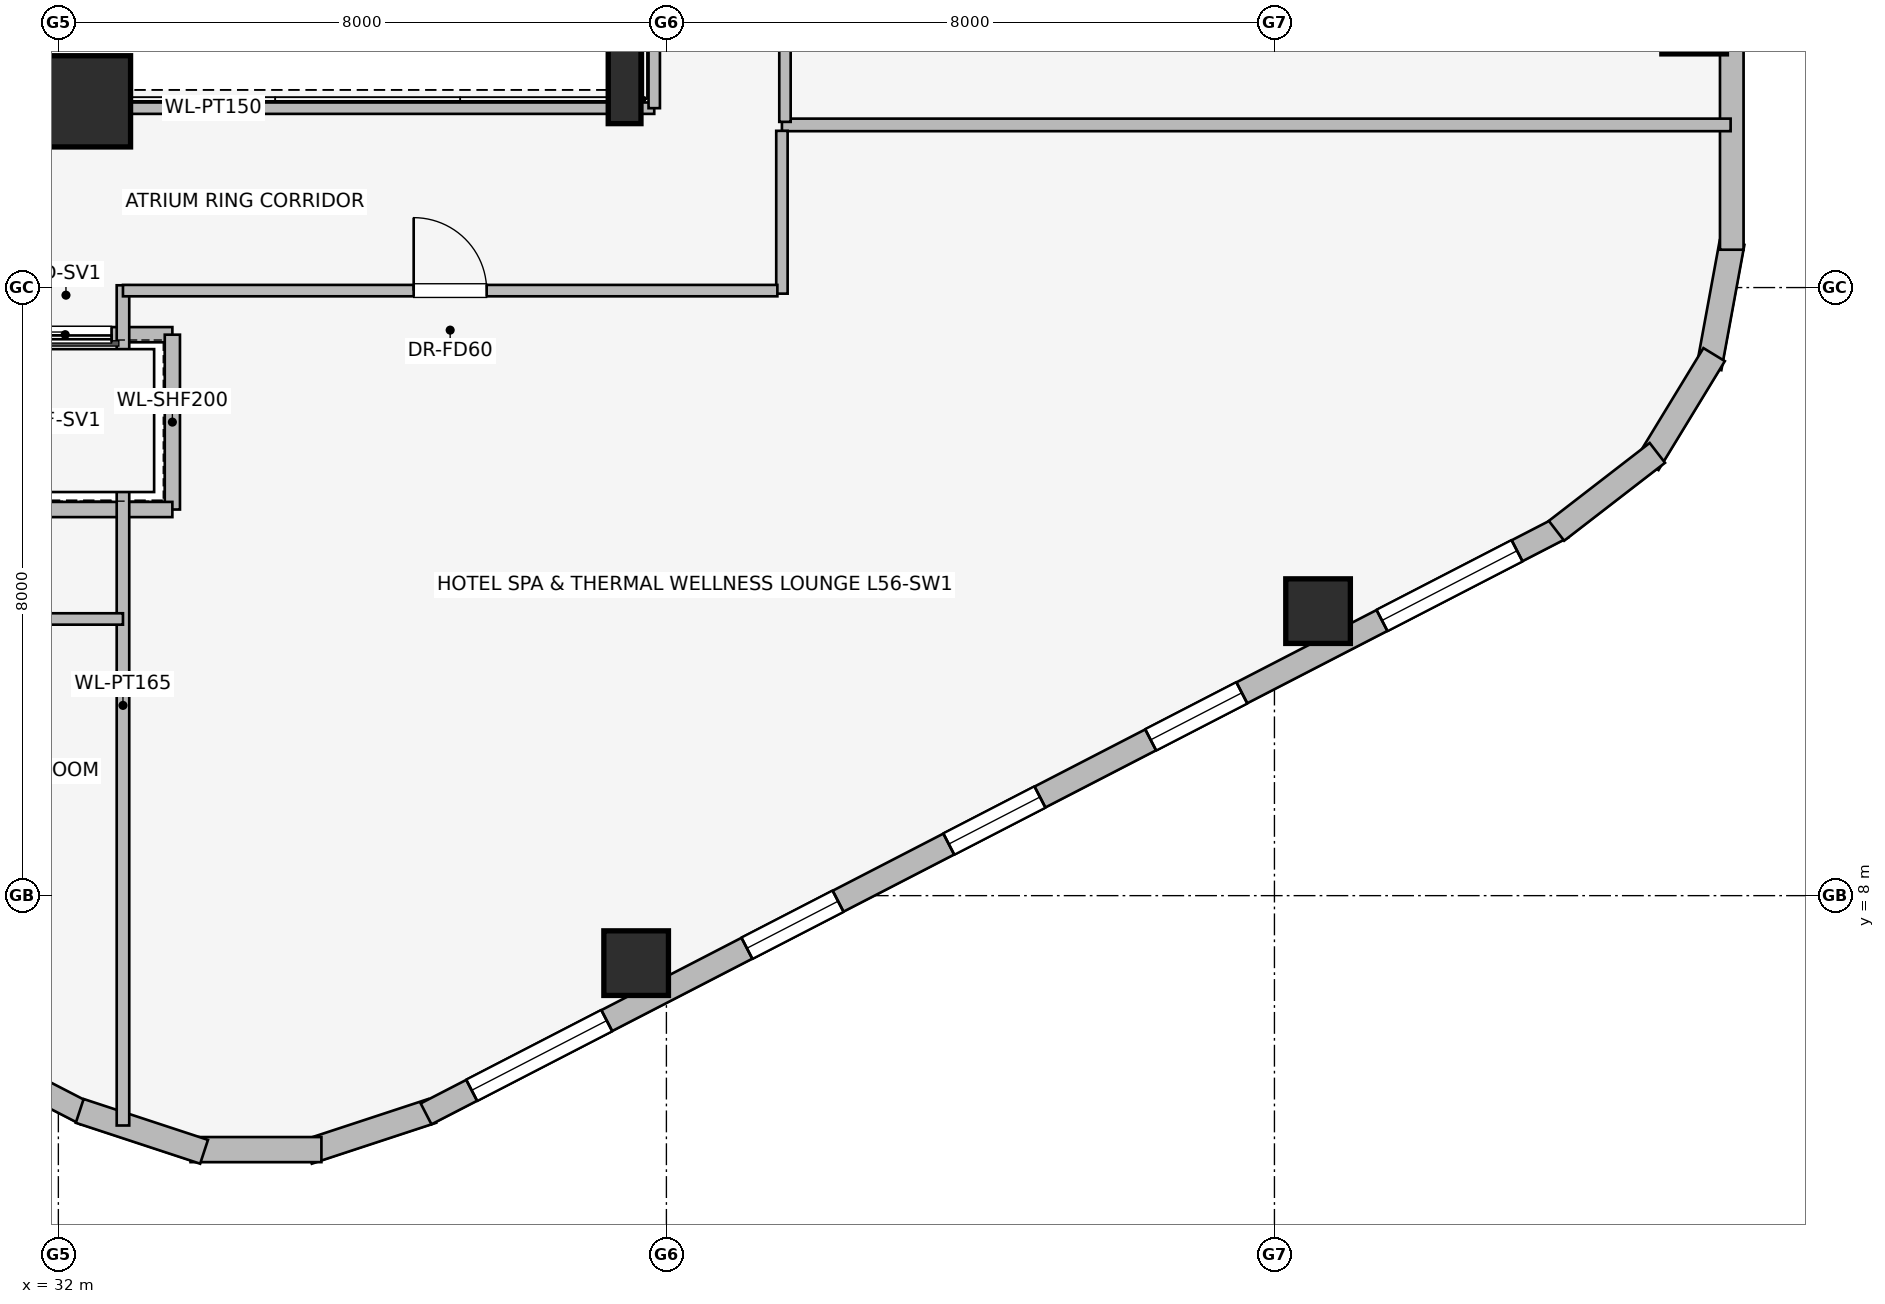
"""IFC4 building model, lengths in metres.
Left out: names, types, materials, properties, quantities, classifications, styles, units other than length and angle.
Written with IfcOpenShell. Run it as: python <this file> out.ifc"""

import sys

from ifc_helpers import new_model, si_unit, direction, frame, frame_2d, origin, origin_2d, place, context, subcontext, project, spatial, rectangle, i_section, extrude, element, fill, save


model = new_model("IFC4")
c1 = context("Model", 3, precision=1e-05, world=origin(), true_north=direction((0.0, 1.0)))
c2 = subcontext(c1, "Body", "Model", "MODEL_VIEW")
j1 = project(units=[si_unit("LENGTHUNIT", "METRE"), si_unit("PLANEANGLEUNIT", "RADIAN")], contexts=[c1])
p1 = place(None, origin())
s1 = spatial("IfcSite", under=j1, at=p1, CompositionType="ELEMENT")
p2 = place(p1, origin())
s2 = spatial("IfcBuilding", under=s1, at=p2, CompositionType="ELEMENT")
p3 = place(p2, frame((0.0, 0.0, 206.8)))
s3 = spatial("IfcBuildingStorey", under=s2, at=p3, CompositionType="ELEMENT", Elevation=206.8)
p4 = place(p3, frame((32.35, 18.45, 0.0), z_axis=(0.0, 0.0, 1.0), x_axis=(1.0, 0.0, 0.0)))
e1 = element("IfcColumn", 1, at=p4, inside=s3, PredefinedType="COLUMN", context=c2, shape_type="SweptSolid", body=[
    extrude(rectangle(XDim=1.2, YDim=1.2, at=origin_2d()), origin(), (0.0, 0.0, 1.0), 3.45),
])
for number, where, z_axis, x_axis in (
    (2, (39.602, 7.112, 0.0), (0.0, 0.0, 1.0), (1.0, 0.0, 0.0)),
    (3, (48.574, 11.743, 0.0), (0.0, 0.0, 1.0), (1.0, 0.0, 0.0)),
    (4, (53.522, 19.499, 0.0), (0.0, 0.0, 1.0), (1.0, 0.0, 0.0)),
):
    element("IfcColumn", number, at=place(p3, frame(where, z_axis=z_axis, x_axis=x_axis)), inside=s3, PredefinedType="COLUMN", context=c2, shape_type="SweptSolid", body=[
        extrude(rectangle(XDim=0.85, YDim=0.85, at=origin_2d()), origin(), (0.0, 0.0, 1.0), 3.45),
    ])
p5 = place(p3, frame((39.45, 18.65, 0.0), z_axis=(0.0, 0.0, 1.0), x_axis=(1.0, 0.0, 0.0)))
e5 = element("IfcColumn", 5, at=p5, inside=s3, PredefinedType="COLUMN", context=c2, shape_type="SweptSolid", body=[
    extrude(i_section(OverallWidth=0.431, OverallDepth=0.987, WebThickness=0.034, FlangeThickness=0.062, at=origin_2d()), origin(), (0.0, 0.0, 1.0), 3.45),
])
p6 = place(p3, frame((32.362, 5.129, 0.0), z_axis=(0.0, 0.0, 1.0), x_axis=(-0.888626188278, 0.458632202867, 0.0)))
e6 = element("IfcWall", 6, at=p6, inside=s3, PredefinedType="STANDARD", context=c2, shape_type="SweptSolid", body=[
    extrude(rectangle(XDim=16.828, YDim=0.31, at=frame_2d((8.414, 0.0))), origin(), (0.0, 0.0, 1.0), 3.19),
])
p7 = place(p6, frame((0.675, 0.0, 0.75)))
e7 = element("IfcOpeningElement", 7, at=p7, cuts=e6, PredefinedType="OPENING", context=c2, shape_type="SweptSolid", body=[
    extrude(rectangle(XDim=2.0, YDim=1.5, at=frame_2d((1.0, 0.75))), frame((0.0, 0.165, 0.0), z_axis=(0.0, -1.0, 0.0), x_axis=(1.0, 0.0, 0.0)), (0.0, 0.0, 1.0), 0.33),
])
p8 = place(p6, frame((4.75, 0.0, 0.75)))
e8 = element("IfcOpeningElement", 8, at=p8, cuts=e6, PredefinedType="OPENING", context=c2, shape_type="SweptSolid", body=[
    extrude(rectangle(XDim=1.35, YDim=1.45, at=frame_2d((0.675, 0.725))), frame((0.0, 0.165, 0.0), z_axis=(0.0, -1.0, 0.0), x_axis=(1.0, 0.0, 0.0)), (0.0, 0.0, 1.0), 0.33),
])
p9 = place(p6, frame((7.739, 0.0, 0.75)))
e9 = element("IfcOpeningElement", 9, at=p9, cuts=e6, PredefinedType="OPENING", context=c2, shape_type="SweptSolid", body=[
    extrude(rectangle(XDim=1.35, YDim=1.45, at=frame_2d((0.675, 0.725))), frame((0.0, 0.165, 0.0), z_axis=(0.0, -1.0, 0.0), x_axis=(1.0, 0.0, 0.0)), (0.0, 0.0, 1.0), 0.33),
])
p10 = place(p6, frame((10.728, 0.0, 0.75)))
e10 = element("IfcOpeningElement", 10, at=p10, cuts=e6, PredefinedType="OPENING", context=c2, shape_type="SweptSolid", body=[
    extrude(rectangle(XDim=1.35, YDim=1.45, at=frame_2d((0.675, 0.725))), frame((0.0, 0.165, 0.0), z_axis=(0.0, -1.0, 0.0), x_axis=(1.0, 0.0, 0.0)), (0.0, 0.0, 1.0), 0.33),
])
p11 = place(p6, frame((14.885, 0.0, 0.75)))
e11 = element("IfcOpeningElement", 11, at=p11, cuts=e6, PredefinedType="OPENING", context=c2, shape_type="SweptSolid", body=[
    extrude(rectangle(XDim=1.05, YDim=1.4, at=frame_2d((0.525, 0.7))), frame((0.0, 0.165, 0.0), z_axis=(0.0, -1.0, 0.0), x_axis=(1.0, 0.0, 0.0)), (0.0, 0.0, 1.0), 0.33),
])
p12 = place(p3, frame((36.919, 5.168, 0.0), z_axis=(0.0, 0.0, 1.0), x_axis=(-0.949937416267, -0.312440242569, 0.0)))
e12 = element("IfcWall", 12, at=p12, inside=s3, PredefinedType="STANDARD", context=c2, shape_type="SweptSolid", body=[
    extrude(rectangle(XDim=1.722, YDim=0.33, at=frame_2d((0.861, 0.0))), origin(), (0.0, 0.0, 1.0), 3.19),
])
p13 = place(p3, frame((35.461, 4.659, 0.0), z_axis=(0.0, 0.0, 1.0), x_axis=(-1.0, 0.0, 0.0)))
e13 = element("IfcWall", 13, at=p13, inside=s3, PredefinedType="STANDARD", context=c2, shape_type="SweptSolid", body=[
    extrude(rectangle(XDim=1.722, YDim=0.33, at=frame_2d((0.861, 0.0))), origin(), (0.0, 0.0, 1.0), 3.19),
])
p14 = place(p3, frame((33.917, 4.63, 0.0), z_axis=(0.0, 0.0, 1.0), x_axis=(-0.949937416267, 0.312440242569, 0.0)))
e14 = element("IfcWall", 14, at=p14, inside=s3, PredefinedType="STANDARD", context=c2, shape_type="SweptSolid", body=[
    extrude(rectangle(XDim=1.722, YDim=0.33, at=frame_2d((0.861, 0.0))), origin(), (0.0, 0.0, 1.0), 3.19),
])
p15 = place(p3, frame((51.792, 12.847, 0.0), z_axis=(0.0, 0.0, 1.0), x_axis=(-0.888626188278, -0.458632202867, 0.0)))
e15 = element("IfcWall", 15, at=p15, inside=s3, PredefinedType="STANDARD", context=c2, shape_type="SweptSolid", body=[
    extrude(rectangle(XDim=16.828, YDim=0.31, at=frame_2d((8.414, 0.0))), origin(), (0.0, 0.0, 1.0), 3.19),
])
p16 = place(p15, frame((0.675, 0.0, 0.75)))
e16 = element("IfcOpeningElement", 16, at=p16, cuts=e15, PredefinedType="OPENING", context=c2, shape_type="SweptSolid", body=[
    extrude(rectangle(XDim=2.0, YDim=1.5, at=frame_2d((1.0, 0.75))), frame((0.0, 0.165, 0.0), z_axis=(0.0, -1.0, 0.0), x_axis=(1.0, 0.0, 0.0)), (0.0, 0.0, 1.0), 0.33),
])
p17 = place(p15, frame((4.75, 0.0, 0.75)))
e17 = element("IfcOpeningElement", 17, at=p17, cuts=e15, PredefinedType="OPENING", context=c2, shape_type="SweptSolid", body=[
    extrude(rectangle(XDim=1.35, YDim=1.45, at=frame_2d((0.675, 0.725))), frame((0.0, 0.165, 0.0), z_axis=(0.0, -1.0, 0.0), x_axis=(1.0, 0.0, 0.0)), (0.0, 0.0, 1.0), 0.33),
])
p18 = place(p15, frame((7.739, 0.0, 0.75)))
e18 = element("IfcOpeningElement", 18, at=p18, cuts=e15, PredefinedType="OPENING", context=c2, shape_type="SweptSolid", body=[
    extrude(rectangle(XDim=1.35, YDim=1.45, at=frame_2d((0.675, 0.725))), frame((0.0, 0.165, 0.0), z_axis=(0.0, -1.0, 0.0), x_axis=(1.0, 0.0, 0.0)), (0.0, 0.0, 1.0), 0.33),
])
p19 = place(p15, frame((10.728, 0.0, 0.75)))
e19 = element("IfcOpeningElement", 19, at=p19, cuts=e15, PredefinedType="OPENING", context=c2, shape_type="SweptSolid", body=[
    extrude(rectangle(XDim=1.35, YDim=1.45, at=frame_2d((0.675, 0.725))), frame((0.0, 0.165, 0.0), z_axis=(0.0, -1.0, 0.0), x_axis=(1.0, 0.0, 0.0)), (0.0, 0.0, 1.0), 0.33),
])
p20 = place(p15, frame((14.153, 0.0, 0.75)))
e20 = element("IfcOpeningElement", 20, at=p20, cuts=e15, PredefinedType="OPENING", context=c2, shape_type="SweptSolid", body=[
    extrude(rectangle(XDim=2.0, YDim=1.5, at=frame_2d((1.0, 0.75))), frame((0.0, 0.165, 0.0), z_axis=(0.0, -1.0, 0.0), x_axis=(1.0, 0.0, 0.0)), (0.0, 0.0, 1.0), 0.33),
])
p21 = place(p3, frame((54.021, 16.592, 0.0), z_axis=(0.0, 0.0, 1.0), x_axis=(-0.180717642671, -0.983535019014, 0.0)))
e21 = element("IfcWall", 21, at=p21, inside=s3, PredefinedType="STANDARD", context=c2, shape_type="SweptSolid", body=[
    extrude(rectangle(XDim=1.677, YDim=0.33, at=frame_2d((0.838, 0.0))), origin(), (0.0, 0.0, 1.0), 3.19),
])
p22 = place(p3, frame((53.785, 15.118, 0.0), z_axis=(0.0, 0.0, 1.0), x_axis=(-0.520219286058, -0.85403272444, 0.0)))
e22 = element("IfcWall", 22, at=p22, inside=s3, PredefinedType="STANDARD", context=c2, shape_type="SweptSolid", body=[
    extrude(rectangle(XDim=1.678, YDim=0.33, at=frame_2d((0.839, 0.0))), origin(), (0.0, 0.0, 1.0), 3.19),
])
p23 = place(p3, frame((53.038, 13.825, 0.0), z_axis=(0.0, 0.0, 1.0), x_axis=(-0.791464279355, -0.611215423976, 0.0)))
e23 = element("IfcWall", 23, at=p23, inside=s3, PredefinedType="STANDARD", context=c2, shape_type="SweptSolid", body=[
    extrude(rectangle(XDim=1.677, YDim=0.33, at=frame_2d((0.838, 0.0))), origin(), (0.0, 0.0, 1.0), 3.19),
])
p24 = place(p3, frame((54.017, 31.502, 0.0), z_axis=(0.0, 0.0, 1.0), x_axis=(0.0, -1.0, 0.0)))
e24 = element("IfcWall", 24, at=p24, inside=s3, PredefinedType="STANDARD", context=c2, shape_type="SweptSolid", body=[
    extrude(rectangle(XDim=15.004, YDim=0.31, at=frame_2d((7.502, 0.0))), origin(), (0.0, 0.0, 1.0), 3.19),
])
p25 = place(p24, frame((4.007, 0.0, 0.75)))
e25 = element("IfcOpeningElement", 25, at=p25, cuts=e24, PredefinedType="OPENING", context=c2, shape_type="SweptSolid", body=[
    extrude(rectangle(XDim=1.05, YDim=1.4, at=frame_2d((0.525, 0.7))), frame((0.0, 0.165, 0.0), z_axis=(0.0, -1.0, 0.0), x_axis=(1.0, 0.0, 0.0)), (0.0, 0.0, 1.0), 0.33),
])
p26 = place(p24, frame((6.833, 0.0, 0.75)))
e26 = element("IfcOpeningElement", 26, at=p26, cuts=e24, PredefinedType="OPENING", context=c2, shape_type="SweptSolid", body=[
    extrude(rectangle(XDim=1.35, YDim=1.45, at=frame_2d((0.675, 0.725))), frame((0.0, 0.165, 0.0), z_axis=(0.0, -1.0, 0.0), x_axis=(1.0, 0.0, 0.0)), (0.0, 0.0, 1.0), 0.33),
])
p27 = place(p24, frame((9.953, 0.0, 0.75)))
e27 = element("IfcOpeningElement", 27, at=p27, cuts=e24, PredefinedType="OPENING", context=c2, shape_type="SweptSolid", body=[
    extrude(rectangle(XDim=1.05, YDim=1.4, at=frame_2d((0.525, 0.7))), frame((0.0, 0.165, 0.0), z_axis=(0.0, -1.0, 0.0), x_axis=(1.0, 0.0, 0.0)), (0.0, 0.0, 1.0), 0.33),
])
p28 = place(p3, frame((33.5, 15.38, 0.0), z_axis=(0.0, 0.0, 1.0), x_axis=(-1.0, 0.0, 0.0)))
e28 = element("IfcWall", 28, at=p28, inside=s3, PredefinedType="PARTITIONING", context=c2, shape_type="SweptSolid", body=[
    extrude(rectangle(XDim=2.82, YDim=0.2, at=frame_2d((1.41, 0.0))), origin(), (0.0, 0.0, 1.0), 3.19),
])
p29 = place(p28, frame((0.8, 0.0, 0.0)))
e29 = element("IfcOpeningElement", 29, at=p29, cuts=e28, PredefinedType="OPENING", context=c2, shape_type="SweptSolid", body=[
    extrude(rectangle(XDim=1.2, YDim=2.2, at=frame_2d((0.6, 1.1))), frame((0.0, 0.11, 0.0), z_axis=(0.0, -1.0, 0.0), x_axis=(1.0, 0.0, 0.0)), (0.0, 0.0, 1.0), 0.22),
])
p30 = place(p3, frame((33.5, 13.08, 0.0), z_axis=(0.0, 0.0, 1.0), x_axis=(0.0, 1.0, 0.0)))
e30 = element("IfcWall", 30, at=p30, inside=s3, PredefinedType="PARTITIONING", context=c2, shape_type="SweptSolid", body=[
    extrude(rectangle(XDim=2.3, YDim=0.2, at=frame_2d((1.15, 0.0))), origin(), (0.0, 0.0, 1.0), 3.19),
])
p31 = place(p3, frame((30.879, 13.08, 0.0), z_axis=(0.0, 0.0, 1.0), x_axis=(1.0, 0.0, 0.0)))
e31 = element("IfcWall", 31, at=p31, inside=s3, PredefinedType="PARTITIONING", context=c2, shape_type="SweptSolid", body=[
    extrude(rectangle(XDim=2.621, YDim=0.2, at=frame_2d((1.311, 0.0))), origin(), (0.0, 0.0, 1.0), 3.19),
])
p32 = place(p3, frame((27.675, 18.36, 0.0), z_axis=(0.0, 0.0, 1.0), x_axis=(1.0, 0.0, 0.0)))
e32 = element("IfcWall", 32, at=p32, inside=s3, PredefinedType="PARTITIONING", context=c2, shape_type="SweptSolid", body=[
    extrude(rectangle(XDim=12.165, YDim=0.15, at=frame_2d((6.083, 0.0))), origin(), (0.0, 0.0, 1.0), 2.331),
])
p33 = place(p3, frame((39.84, 18.36, 0.0), z_axis=(0.0, 0.0, 1.0), x_axis=(0.0, 1.0, 0.0)))
e33 = element("IfcWall", 33, at=p33, inside=s3, PredefinedType="PARTITIONING", context=c2, shape_type="SweptSolid", body=[
    extrude(rectangle(XDim=11.28, YDim=0.15, at=frame_2d((5.64, 0.0))), origin(), (0.0, 0.0, 1.0), 3.19),
])
p34 = place(p3, frame((32.85, 4.976, 0.0), z_axis=(0.0, 0.0, 1.0), x_axis=(0.0, 1.0, 0.0)))
e34 = element("IfcWall", 34, at=p34, inside=s3, PredefinedType="PARTITIONING", context=c2, shape_type="SweptSolid", body=[
    extrude(rectangle(XDim=11.054, YDim=0.165, at=frame_2d((5.527, 0.0))), origin(), (0.0, 0.0, 1.0), 3.19),
])
p35 = place(p3, frame((19.757, 11.64, 0.0), z_axis=(0.0, 0.0, 1.0), x_axis=(1.0, 0.0, 0.0)))
e35 = element("IfcWall", 35, at=p35, inside=s3, PredefinedType="PARTITIONING", context=c2, shape_type="SweptSolid", body=[
    extrude(rectangle(XDim=13.093, YDim=0.15, at=frame_2d((6.546, 0.0))), origin(), (0.0, 0.0, 1.0), 3.19),
])
p36 = place(p35, frame((3.243, 0.0, 0.0)))
e36 = element("IfcOpeningElement", 36, at=p36, cuts=e35, PredefinedType="OPENING", context=c2, shape_type="SweptSolid", body=[
    extrude(rectangle(XDim=0.9, YDim=2.0, at=frame_2d((0.45, 1.0))), frame((0.0, 0.085, 0.0), z_axis=(0.0, -1.0, 0.0), x_axis=(1.0, 0.0, 0.0)), (0.0, 0.0, 1.0), 0.17),
])
p37 = place(p3, frame((41.52, 18.14, 0.0), z_axis=(0.0, 0.0, 1.0), x_axis=(1.0, 0.0, 0.0)))
e37 = element("IfcWall", 37, at=p37, inside=s3, PredefinedType="PARTITIONING", context=c2, shape_type="SweptSolid", body=[
    extrude(rectangle(XDim=12.482, YDim=0.165, at=frame_2d((6.241, 0.0))), origin(), (0.0, 0.0, 1.0), 3.19),
])
p38 = place(p3, frame((41.56, 18.18, 0.0), z_axis=(0.0, 0.0, 1.0), x_axis=(0.0, 1.0, 0.0)))
e38 = element("IfcWall", 38, at=p38, inside=s3, PredefinedType="PARTITIONING", context=c2, shape_type="SweptSolid", body=[
    extrude(rectangle(XDim=4.149, YDim=0.15, at=frame_2d((2.075, 0.0))), origin(), (0.0, 0.0, 1.0), 3.19),
])
p39 = place(p38, frame((1.595, 0.0, 0.0)))
e39 = element("IfcOpeningElement", 39, at=p39, cuts=e38, PredefinedType="OPENING", context=c2, shape_type="SweptSolid", body=[
    extrude(rectangle(XDim=0.96, YDim=2.0, at=frame_2d((0.48, 1.0))), frame((0.0, 0.085, 0.0), z_axis=(0.0, -1.0, 0.0), x_axis=(1.0, 0.0, 0.0)), (0.0, 0.0, 1.0), 0.17),
])
p40 = place(p3, frame((41.52, 15.92, 0.0), z_axis=(0.0, 0.0, 1.0), x_axis=(0.0, 1.0, 0.0)))
e40 = element("IfcWall", 40, at=p40, inside=s3, PredefinedType="PARTITIONING", context=c2, shape_type="SweptSolid", body=[
    extrude(rectangle(XDim=2.142, YDim=0.15, at=frame_2d((1.071, 0.0))), origin(), (0.0, 0.0, 1.0), 3.19),
])
p41 = place(p3, frame((32.85, 15.96, 0.0), z_axis=(0.0, 0.0, 1.0), x_axis=(1.0, 0.0, 0.0)))
e41 = element("IfcWall", 41, at=p41, inside=s3, PredefinedType="PARTITIONING", context=c2, shape_type="SweptSolid", body=[
    extrude(rectangle(XDim=8.61, YDim=0.15, at=frame_2d((4.305, 0.0))), origin(), (0.0, 0.0, 1.0), 3.19),
])
p42 = place(p41, frame((3.825, 0.0, 0.0)))
e42 = element("IfcOpeningElement", 42, at=p42, cuts=e41, PredefinedType="OPENING", context=c2, shape_type="SweptSolid", body=[
    extrude(rectangle(XDim=0.96, YDim=2.0, at=frame_2d((0.48, 1.0))), frame((0.0, 0.085, 0.0), z_axis=(0.0, -1.0, 0.0), x_axis=(1.0, 0.0, 0.0)), (0.0, 0.0, 1.0), 0.17),
])
p43 = place(p16, origin())
e43 = element("IfcWindow", 43, at=p43, inside=s3, PartitioningType="SINGLE_PANEL", PredefinedType="WINDOW", context=c2, shape_type="SweptSolid", body=[
    extrude(rectangle(XDim=2.0, YDim=1.5, at=frame_2d((1.0, 0.75))), frame((0.0, 0.03, 0.0), z_axis=(0.0, -1.0, 0.0), x_axis=(1.0, 0.0, 0.0)), (0.0, 0.0, 1.0), 0.06),
])
fill(e16, e43)
p44 = place(p17, origin())
e44 = element("IfcWindow", 44, at=p44, inside=s3, PartitioningType="SINGLE_PANEL", PredefinedType="WINDOW", context=c2, shape_type="SweptSolid", body=[
    extrude(rectangle(XDim=1.35, YDim=1.45, at=frame_2d((0.675, 0.725))), frame((0.0, 0.03, 0.0), z_axis=(0.0, -1.0, 0.0), x_axis=(1.0, 0.0, 0.0)), (0.0, 0.0, 1.0), 0.06),
])
fill(e17, e44)
p45 = place(p18, origin())
e45 = element("IfcWindow", 45, at=p45, inside=s3, PartitioningType="SINGLE_PANEL", PredefinedType="WINDOW", context=c2, shape_type="SweptSolid", body=[
    extrude(rectangle(XDim=1.35, YDim=1.45, at=frame_2d((0.675, 0.725))), frame((0.0, 0.03, 0.0), z_axis=(0.0, -1.0, 0.0), x_axis=(1.0, 0.0, 0.0)), (0.0, 0.0, 1.0), 0.06),
])
fill(e18, e45)
p46 = place(p19, origin())
e46 = element("IfcWindow", 46, at=p46, inside=s3, PartitioningType="SINGLE_PANEL", PredefinedType="WINDOW", context=c2, shape_type="SweptSolid", body=[
    extrude(rectangle(XDim=1.35, YDim=1.45, at=frame_2d((0.675, 0.725))), frame((0.0, 0.03, 0.0), z_axis=(0.0, -1.0, 0.0), x_axis=(1.0, 0.0, 0.0)), (0.0, 0.0, 1.0), 0.06),
])
fill(e19, e46)
p47 = place(p20, origin())
e47 = element("IfcWindow", 47, at=p47, inside=s3, PartitioningType="SINGLE_PANEL", PredefinedType="WINDOW", context=c2, shape_type="SweptSolid", body=[
    extrude(rectangle(XDim=2.0, YDim=1.5, at=frame_2d((1.0, 0.75))), frame((0.0, 0.03, 0.0), z_axis=(0.0, -1.0, 0.0), x_axis=(1.0, 0.0, 0.0)), (0.0, 0.0, 1.0), 0.06),
])
fill(e20, e47)
p48 = place(p29, origin())
e48 = element("IfcDoor", 48, at=p48, inside=s3, OperationType="SLIDING_TO_RIGHT", PredefinedType="DOOR", context=c2, shape_type="SweptSolid", body=[
    extrude(rectangle(XDim=1.2, YDim=2.2, at=frame_2d((0.6, 1.1))), frame((0.0, 0.025, 0.0), z_axis=(0.0, -1.0, 0.0), x_axis=(1.0, 0.0, 0.0)), (0.0, 0.0, 1.0), 0.05),
])
fill(e29, e48)
p49 = place(p42, origin())
e49 = element("IfcDoor", 49, at=p49, inside=s3, OperationType="SINGLE_SWING_LEFT", PredefinedType="DOOR", context=c2, shape_type="SweptSolid", body=[
    extrude(rectangle(XDim=0.96, YDim=2.0, at=frame_2d((0.48, 1.0))), frame((0.0, 0.025, 0.0), z_axis=(0.0, -1.0, 0.0), x_axis=(1.0, 0.0, 0.0)), (0.0, 0.0, 1.0), 0.05),
])
fill(e42, e49)
save(model, sys.argv[1])
